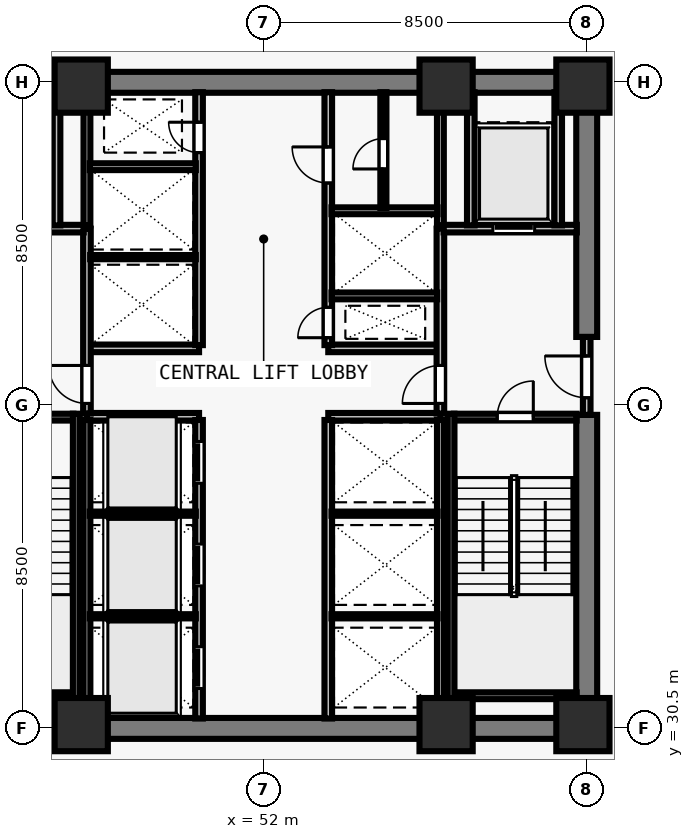
"""IFC4 building model, lengths in metres.
Left out: names, types, materials, properties, quantities, classifications, styles, units other than length and angle.
Written with IfcOpenShell. Run it as: python <this file> out.ifc"""

import sys

from ifc_helpers import new_model, si_unit, direction, frame, frame_2d, origin, origin_2d, place, context, subcontext, project, spatial, rectangle, extrude, element, fill, save


model = new_model("IFC4")
c1 = context("Model", 3, precision=1e-05, world=origin(), true_north=direction((0.0, 1.0)))
c2 = subcontext(c1, "Body", "Model", "MODEL_VIEW")
j1 = project(units=[si_unit("LENGTHUNIT", "METRE"), si_unit("PLANEANGLEUNIT", "RADIAN")], contexts=[c1])
p1 = place(None, origin())
s1 = spatial("IfcSite", under=j1, at=p1, CompositionType="ELEMENT")
p2 = place(p1, origin())
s2 = spatial("IfcBuilding", under=s1, at=p2, CompositionType="ELEMENT")
p3 = place(p2, frame((0.0, 0.0, 14.5)))
s3 = spatial("IfcBuildingStorey", under=s2, at=p3, CompositionType="ELEMENT", Elevation=14.5)
for number, where, z_axis, x_axis in (
    (1, (47.2, 30.6, 0.0), (0.0, 0.0, 1.0), (1.0, 0.0, 0.0)),
    (2, (56.8, 30.6, 0.0), (0.0, 0.0, 1.0), (1.0, 0.0, 0.0)),
    (3, (60.4, 30.6, 0.0), (0.0, 0.0, 1.0), (1.0, 0.0, 0.0)),
    (4, (47.2, 47.4, 0.0), (0.0, 0.0, 1.0), (1.0, 0.0, 0.0)),
    (5, (56.8, 47.4, 0.0), (0.0, 0.0, 1.0), (1.0, 0.0, 0.0)),
    (6, (60.4, 47.4, 0.0), (0.0, 0.0, 1.0), (1.0, 0.0, 0.0)),
):
    element("IfcColumn", number, at=place(p3, frame(where, z_axis=z_axis, x_axis=x_axis)), inside=s3, PredefinedType="COLUMN", context=c2, shape_type="SweptSolid", body=[
        extrude(rectangle(XDim=1.4, YDim=1.4, at=origin_2d()), origin(), (0.0, 0.0, 1.0), 4.5),
    ])
for number, where, z_axis, x_axis in (
    (7, (43.225, 30.5, 0.0), (0.0, 0.0, 1.0), (1.0, 0.0, 0.0)),
    (8, (43.225, 47.5, 0.0), (0.0, 0.0, 1.0), (1.0, 0.0, 0.0)),
):
    element("IfcWall", number, at=place(p3, frame(where, z_axis=z_axis, x_axis=x_axis)), inside=s3, PredefinedType="SHEAR", context=c2, shape_type="SweptSolid", body=[
        extrude(rectangle(XDim=17.55, YDim=0.55, at=frame_2d((8.775, 0.0))), origin(), (0.0, 0.0, 1.0), 4.15),
    ])
p4 = place(p3, frame((60.5, 30.765, 0.0), z_axis=(0.0, 0.0, 1.0), x_axis=(0.0, 1.0, 0.0)))
e9 = element("IfcWall", 9, at=p4, inside=s3, PredefinedType="SHEAR", context=c2, shape_type="SweptSolid", body=[
    extrude(rectangle(XDim=7.985, YDim=0.55, at=frame_2d((3.993, 0.0))), origin(), (0.0, 0.0, 1.0), 4.15),
])
p5 = place(p3, frame((60.5, 40.8, 0.0), z_axis=(0.0, 0.0, 1.0), x_axis=(0.0, 1.0, 0.0)))
e10 = element("IfcWall", 10, at=p5, inside=s3, PredefinedType="SHEAR", context=c2, shape_type="SweptSolid", body=[
    extrude(rectangle(XDim=6.435, YDim=0.55, at=frame_2d((3.218, 0.0))), origin(), (0.0, 0.0, 1.0), 4.15),
])
for number, where, z_axis, x_axis in (
    (11, (47.35, 38.7, 0.0), (0.0, 0.0, 1.0), (1.0, 0.0, 0.0)),
    (12, (47.35, 40.5, 0.0), (0.0, 0.0, 1.0), (1.0, 0.0, 0.0)),
    (13, (53.7, 38.7, 0.0), (0.0, 0.0, 1.0), (1.0, 0.0, 0.0)),
    (14, (53.7, 40.5, 0.0), (0.0, 0.0, 1.0), (1.0, 0.0, 0.0)),
):
    element("IfcWall", number, at=place(p3, frame(where, z_axis=z_axis, x_axis=x_axis)), inside=s3, PredefinedType="SOLIDWALL", context=c2, shape_type="SweptSolid", body=[
        extrude(rectangle(XDim=2.95, YDim=0.2, at=frame_2d((1.475, 0.0))), origin(), (0.0, 0.0, 1.0), 4.15),
    ])
p6 = place(p3, frame((50.3, 30.76, 0.0), z_axis=(0.0, 0.0, 1.0), x_axis=(0.0, 1.0, 0.0)))
e15 = element("IfcWall", 15, at=p6, inside=s3, PredefinedType="SOLIDWALL", context=c2, shape_type="SweptSolid", body=[
    extrude(rectangle(XDim=7.855, YDim=0.2, at=frame_2d((3.927, 0.0))), origin(), (0.0, 0.0, 1.0), 4.15),
])
p7 = place(p6, frame((0.79, 0.0, 0.0)))
e16 = element("IfcOpeningElement", 16, at=p7, cuts=e15, PredefinedType="OPENING", context=c2, shape_type="SweptSolid", body=[
    extrude(rectangle(XDim=1.1, YDim=2.2, at=frame_2d((0.55, 1.1))), frame((0.0, 0.11, 0.0), z_axis=(0.0, -1.0, 0.0), x_axis=(1.0, 0.0, 0.0)), (0.0, 0.0, 1.0), 0.22),
])
p8 = place(p6, frame((3.49, 0.0, 0.0)))
e17 = element("IfcOpeningElement", 17, at=p8, cuts=e15, PredefinedType="OPENING", context=c2, shape_type="SweptSolid", body=[
    extrude(rectangle(XDim=1.1, YDim=2.2, at=frame_2d((0.55, 1.1))), frame((0.0, 0.11, 0.0), z_axis=(0.0, -1.0, 0.0), x_axis=(1.0, 0.0, 0.0)), (0.0, 0.0, 1.0), 0.22),
])
p9 = place(p6, frame((6.19, 0.0, 0.0)))
e18 = element("IfcOpeningElement", 18, at=p9, cuts=e15, PredefinedType="OPENING", context=c2, shape_type="SweptSolid", body=[
    extrude(rectangle(XDim=1.1, YDim=2.2, at=frame_2d((0.55, 1.1))), frame((0.0, 0.11, 0.0), z_axis=(0.0, -1.0, 0.0), x_axis=(1.0, 0.0, 0.0)), (0.0, 0.0, 1.0), 0.22),
])
p10 = place(p3, frame((53.7, 30.76, 0.0), z_axis=(0.0, 0.0, 1.0), x_axis=(0.0, 1.0, 0.0)))
e19 = element("IfcWall", 19, at=p10, inside=s3, PredefinedType="SOLIDWALL", context=c2, shape_type="SweptSolid", body=[
    extrude(rectangle(XDim=7.855, YDim=0.2, at=frame_2d((3.927, 0.0))), origin(), (0.0, 0.0, 1.0), 4.15),
])
p11 = place(p3, frame((50.3, 40.585, 0.0), z_axis=(0.0, 0.0, 1.0), x_axis=(0.0, 1.0, 0.0)))
e20 = element("IfcWall", 20, at=p11, inside=s3, PredefinedType="SOLIDWALL", context=c2, shape_type="SweptSolid", body=[
    extrude(rectangle(XDim=6.655, YDim=0.2, at=frame_2d((3.328, 0.0))), origin(), (0.0, 0.0, 1.0), 4.15),
])
p12 = place(p11, frame((5.065, 0.0, 0.0)))
e21 = element("IfcOpeningElement", 21, at=p12, cuts=e20, PredefinedType="OPENING", context=c2, shape_type="SweptSolid", body=[
    extrude(rectangle(XDim=0.8, YDim=2.08, at=frame_2d((0.4, 1.04))), frame((0.0, 0.11, 0.0), z_axis=(0.0, -1.0, 0.0), x_axis=(1.0, 0.0, 0.0)), (0.0, 0.0, 1.0), 0.22),
])
p13 = place(p3, frame((53.7, 40.585, 0.0), z_axis=(0.0, 0.0, 1.0), x_axis=(0.0, 1.0, 0.0)))
e22 = element("IfcWall", 22, at=p13, inside=s3, PredefinedType="SOLIDWALL", context=c2, shape_type="SweptSolid", body=[
    extrude(rectangle(XDim=6.655, YDim=0.2, at=frame_2d((3.328, 0.0))), origin(), (0.0, 0.0, 1.0), 4.15),
])
p14 = place(p13, frame((0.195, 0.0, 0.0)))
e23 = element("IfcOpeningElement", 23, at=p14, cuts=e22, PredefinedType="OPENING", context=c2, shape_type="SweptSolid", body=[
    extrude(rectangle(XDim=0.8, YDim=2.08, at=frame_2d((0.4, 1.04))), frame((0.0, 0.11, 0.0), z_axis=(0.0, -1.0, 0.0), x_axis=(1.0, 0.0, 0.0)), (0.0, 0.0, 1.0), 0.22),
])
p15 = place(p13, frame((4.265, 0.0, 0.0)))
e24 = element("IfcOpeningElement", 24, at=p15, cuts=e22, PredefinedType="OPENING", context=c2, shape_type="SweptSolid", body=[
    extrude(rectangle(XDim=0.95, YDim=2.12, at=frame_2d((0.475, 1.06))), frame((0.0, 0.11, 0.0), z_axis=(0.0, -1.0, 0.0), x_axis=(1.0, 0.0, 0.0)), (0.0, 0.0, 1.0), 0.22),
])
p16 = place(p3, frame((47.35, 38.785, 0.0), z_axis=(0.0, 0.0, 1.0), x_axis=(0.0, 1.0, 0.0)))
e25 = element("IfcWall", 25, at=p16, inside=s3, PredefinedType="SOLIDWALL", context=c2, shape_type="SweptSolid", body=[
    extrude(rectangle(XDim=4.865, YDim=0.2, at=frame_2d((2.433, 0.0))), origin(), (0.0, 0.0, 1.0), 4.15),
])
p17 = place(p16, frame((0.265, 0.0, 0.0)))
e26 = element("IfcOpeningElement", 26, at=p17, cuts=e25, PredefinedType="OPENING", context=c2, shape_type="SweptSolid", body=[
    extrude(rectangle(XDim=1.0, YDim=2.15, at=frame_2d((0.5, 1.075))), frame((0.0, 0.11, 0.0), z_axis=(0.0, -1.0, 0.0), x_axis=(1.0, 0.0, 0.0)), (0.0, 0.0, 1.0), 0.22),
])
p18 = place(p3, frame((43.76, 43.65, 0.0), z_axis=(0.0, 0.0, 1.0), x_axis=(1.0, 0.0, 0.0)))
e27 = element("IfcWall", 27, at=p18, inside=s3, PredefinedType="SOLIDWALL", context=c2, shape_type="SweptSolid", body=[
    extrude(rectangle(XDim=3.505, YDim=0.2, at=frame_2d((1.752, 0.0))), origin(), (0.0, 0.0, 1.0), 4.15),
])
p19 = place(p18, frame((1.11, 0.0, 0.0)))
e28 = element("IfcOpeningElement", 28, at=p19, cuts=e27, PredefinedType="OPENING", context=c2, shape_type="SweptSolid", body=[
    extrude(rectangle(XDim=1.1, YDim=2.2, at=frame_2d((0.55, 1.1))), frame((0.0, 0.11, 0.0), z_axis=(0.0, -1.0, 0.0), x_axis=(1.0, 0.0, 0.0)), (0.0, 0.0, 1.0), 0.22),
])
p20 = place(p3, frame((46.55, 43.735, 0.0), z_axis=(0.0, 0.0, 1.0), x_axis=(0.0, 1.0, 0.0)))
e29 = element("IfcWall", 29, at=p20, inside=s3, PredefinedType="SOLIDWALL", context=c2, shape_type="SweptSolid", body=[
    extrude(rectangle(XDim=3.505, YDim=0.2, at=frame_2d((1.752, 0.0))), origin(), (0.0, 0.0, 1.0), 4.15),
])
p21 = place(p3, frame((60.5, 38.75, 0.0), z_axis=(0.0, 0.0, 1.0), x_axis=(0.0, 1.0, 0.0)))
e30 = element("IfcWall", 30, at=p21, inside=s3, PredefinedType="SOLIDWALL", context=c2, shape_type="SweptSolid", body=[
    extrude(rectangle(XDim=2.05, YDim=0.2, at=frame_2d((1.025, 0.0))), origin(), (0.0, 0.0, 1.0), 4.15),
])
p22 = place(p21, frame((0.45, 0.0, 0.0)))
e31 = element("IfcOpeningElement", 31, at=p22, cuts=e30, PredefinedType="OPENING", context=c2, shape_type="SweptSolid", body=[
    extrude(rectangle(XDim=1.1, YDim=2.15, at=frame_2d((0.55, 1.075))), frame((0.0, 0.11, 0.0), z_axis=(0.0, -1.0, 0.0), x_axis=(1.0, 0.0, 0.0)), (0.0, 0.0, 1.0), 0.22),
])
p23 = place(p3, frame((56.65, 38.785, 0.0), z_axis=(0.0, 0.0, 1.0), x_axis=(0.0, 1.0, 0.0)))
e32 = element("IfcWall", 32, at=p23, inside=s3, PredefinedType="SOLIDWALL", context=c2, shape_type="SweptSolid", body=[
    extrude(rectangle(XDim=4.865, YDim=0.2, at=frame_2d((2.433, 0.0))), origin(), (0.0, 0.0, 1.0), 4.15),
])
p24 = place(p23, frame((0.265, 0.0, 0.0)))
e33 = element("IfcOpeningElement", 33, at=p24, cuts=e32, PredefinedType="OPENING", context=c2, shape_type="SweptSolid", body=[
    extrude(rectangle(XDim=1.0, YDim=2.15, at=frame_2d((0.5, 1.075))), frame((0.0, 0.11, 0.0), z_axis=(0.0, -1.0, 0.0), x_axis=(1.0, 0.0, 0.0)), (0.0, 0.0, 1.0), 0.22),
])
p25 = place(p3, frame((56.735, 43.65, 0.0), z_axis=(0.0, 0.0, 1.0), x_axis=(1.0, 0.0, 0.0)))
e34 = element("IfcWall", 34, at=p25, inside=s3, PredefinedType="SOLIDWALL", context=c2, shape_type="SweptSolid", body=[
    extrude(rectangle(XDim=3.505, YDim=0.2, at=frame_2d((1.752, 0.0))), origin(), (0.0, 0.0, 1.0), 4.15),
])
p26 = place(p25, frame((1.295, 0.0, 0.0)))
e35 = element("IfcOpeningElement", 35, at=p26, cuts=e34, PredefinedType="OPENING", context=c2, shape_type="SweptSolid", body=[
    extrude(rectangle(XDim=1.1, YDim=2.2, at=frame_2d((0.55, 1.1))), frame((0.0, 0.11, 0.0), z_axis=(0.0, -1.0, 0.0), x_axis=(1.0, 0.0, 0.0)), (0.0, 0.0, 1.0), 0.22),
])
for number, where, z_axis, x_axis in (
    (36, (57.45, 43.735, 0.0), (0.0, 0.0, 1.0), (0.0, 1.0, 0.0)),
    (37, (59.75, 43.735, 0.0), (0.0, 0.0, 1.0), (0.0, 1.0, 0.0)),
):
    element("IfcWall", number, at=place(p3, frame(where, z_axis=z_axis, x_axis=x_axis)), inside=s3, PredefinedType="SOLIDWALL", context=c2, shape_type="SweptSolid", body=[
        extrude(rectangle(XDim=3.505, YDim=0.2, at=frame_2d((1.752, 0.0))), origin(), (0.0, 0.0, 1.0), 4.15),
    ])
p27 = place(p3, frame((47.35, 30.76, 0.0), z_axis=(0.0, 0.0, 1.0), x_axis=(0.0, 1.0, 0.0)))
e38 = element("IfcWall", 38, at=p27, inside=s3, PredefinedType="SOLIDWALL", context=c2, shape_type="SweptSolid", body=[
    extrude(rectangle(XDim=7.855, YDim=0.18, at=frame_2d((3.927, 0.0))), origin(), (0.0, 0.0, 1.0), 4.15),
])
for number, where, z_axis, x_axis in (
    (39, (47.425, 33.45, 0.0), (0.0, 0.0, 1.0), (1.0, 0.0, 0.0)),
    (40, (47.425, 36.15, 0.0), (0.0, 0.0, 1.0), (1.0, 0.0, 0.0)),
):
    element("IfcWall", number, at=place(p3, frame(where, z_axis=z_axis, x_axis=x_axis)), inside=s3, PredefinedType="PARTITIONING", context=c2, shape_type="SweptSolid", body=[
        extrude(rectangle(XDim=2.79, YDim=0.11, at=frame_2d((1.395, 0.0))), origin(), (0.0, 0.0, 1.0), 4.15),
    ])
p28 = place(p3, frame((56.65, 30.76, 0.0), z_axis=(0.0, 0.0, 1.0), x_axis=(0.0, 1.0, 0.0)))
e41 = element("IfcWall", 41, at=p28, inside=s3, PredefinedType="SOLIDWALL", context=c2, shape_type="SweptSolid", body=[
    extrude(rectangle(XDim=7.855, YDim=0.18, at=frame_2d((3.927, 0.0))), origin(), (0.0, 0.0, 1.0), 4.15),
])
for number, where, z_axis, x_axis in (
    (42, (53.785, 33.45, 0.0), (0.0, 0.0, 1.0), (1.0, 0.0, 0.0)),
    (43, (53.785, 36.15, 0.0), (0.0, 0.0, 1.0), (1.0, 0.0, 0.0)),
):
    element("IfcWall", number, at=place(p3, frame(where, z_axis=z_axis, x_axis=x_axis)), inside=s3, PredefinedType="PARTITIONING", context=c2, shape_type="SweptSolid", body=[
        extrude(rectangle(XDim=2.79, YDim=0.11, at=frame_2d((1.395, 0.0))), origin(), (0.0, 0.0, 1.0), 4.15),
    ])
p29 = place(p3, frame((47.35, 43.735, 0.0), z_axis=(0.0, 0.0, 1.0), x_axis=(0.0, 1.0, 0.0)))
e44 = element("IfcWall", 44, at=p29, inside=s3, PredefinedType="SOLIDWALL", context=c2, shape_type="SweptSolid", body=[
    extrude(rectangle(XDim=3.505, YDim=0.18, at=frame_2d((1.752, 0.0))), origin(), (0.0, 0.0, 1.0), 4.15),
])
p30 = place(p3, frame((47.435, 42.9, 0.0), z_axis=(0.0, 0.0, 1.0), x_axis=(1.0, 0.0, 0.0)))
e45 = element("IfcWall", 45, at=p30, inside=s3, PredefinedType="PARTITIONING", context=c2, shape_type="SweptSolid", body=[
    extrude(rectangle(XDim=2.78, YDim=0.11, at=frame_2d((1.39, 0.0))), origin(), (0.0, 0.0, 1.0), 4.15),
])
p31 = place(p3, frame((47.425, 45.28, 0.0), z_axis=(0.0, 0.0, 1.0), x_axis=(1.0, 0.0, 0.0)))
e46 = element("IfcWall", 46, at=p31, inside=s3, PredefinedType="SOLIDWALL", context=c2, shape_type="SweptSolid", body=[
    extrude(rectangle(XDim=2.79, YDim=0.18, at=frame_2d((1.395, 0.0))), origin(), (0.0, 0.0, 1.0), 4.15),
])
p32 = place(p3, frame((56.65, 43.735, 0.0), z_axis=(0.0, 0.0, 1.0), x_axis=(0.0, 1.0, 0.0)))
e47 = element("IfcWall", 47, at=p32, inside=s3, PredefinedType="SOLIDWALL", context=c2, shape_type="SweptSolid", body=[
    extrude(rectangle(XDim=3.505, YDim=0.18, at=frame_2d((1.752, 0.0))), origin(), (0.0, 0.0, 1.0), 4.15),
])
p33 = place(p3, frame((53.785, 41.88, 0.0), z_axis=(0.0, 0.0, 1.0), x_axis=(1.0, 0.0, 0.0)))
e48 = element("IfcWall", 48, at=p33, inside=s3, PredefinedType="SOLIDWALL", context=c2, shape_type="SweptSolid", body=[
    extrude(rectangle(XDim=2.78, YDim=0.18, at=frame_2d((1.39, 0.0))), origin(), (0.0, 0.0, 1.0), 4.15),
])
p34 = place(p3, frame((53.785, 44.12, 0.0), z_axis=(0.0, 0.0, 1.0), x_axis=(1.0, 0.0, 0.0)))
e49 = element("IfcWall", 49, at=p34, inside=s3, PredefinedType="SOLIDWALL", context=c2, shape_type="SweptSolid", body=[
    extrude(rectangle(XDim=2.79, YDim=0.18, at=frame_2d((1.395, 0.0))), origin(), (0.0, 0.0, 1.0), 4.15),
])
p35 = place(p3, frame((55.15, 44.195, 0.0), z_axis=(0.0, 0.0, 1.0), x_axis=(0.0, 1.0, 0.0)))
e50 = element("IfcWall", 50, at=p35, inside=s3, PredefinedType="PARTITIONING", context=c2, shape_type="SweptSolid", body=[
    extrude(rectangle(XDim=3.045, YDim=0.16, at=frame_2d((1.522, 0.0))), origin(), (0.0, 0.0, 1.0), 4.15),
])
p36 = place(p35, frame((1.025, 0.0, 0.0)))
e51 = element("IfcOpeningElement", 51, at=p36, cuts=e50, PredefinedType="OPENING", context=c2, shape_type="SweptSolid", body=[
    extrude(rectangle(XDim=0.8, YDim=2.1, at=frame_2d((0.4, 1.05))), frame((0.0, 0.09, 0.0), z_axis=(0.0, -1.0, 0.0), x_axis=(1.0, 0.0, 0.0)), (0.0, 0.0, 1.0), 0.18),
])
p37 = place(p3, frame((43.765, 38.69, 0.0), z_axis=(0.0, 0.0, 1.0), x_axis=(1.0, 0.0, 0.0)))
e52 = element("IfcWall", 52, at=p37, inside=s3, PredefinedType="SOLIDWALL", context=c2, shape_type="SweptSolid", body=[
    extrude(rectangle(XDim=3.23, YDim=0.18, at=frame_2d((1.615, 0.0))), origin(), (0.0, 0.0, 1.0), 4.15),
])
p38 = place(p37, frame((1.14, 0.0, 0.0)))
e53 = element("IfcOpeningElement", 53, at=p38, cuts=e52, PredefinedType="OPENING", context=c2, shape_type="SweptSolid", body=[
    extrude(rectangle(XDim=0.95, YDim=2.15, at=frame_2d((0.475, 1.075))), frame((0.0, 0.1, 0.0), z_axis=(0.0, -1.0, 0.0), x_axis=(1.0, 0.0, 0.0)), (0.0, 0.0, 1.0), 0.2),
])
p39 = place(p3, frame((43.765, 31.36, 0.0), z_axis=(0.0, 0.0, 1.0), x_axis=(1.0, 0.0, 0.0)))
e54 = element("IfcWall", 54, at=p39, inside=s3, PredefinedType="SOLIDWALL", context=c2, shape_type="SweptSolid", body=[
    extrude(rectangle(XDim=3.23, YDim=0.18, at=frame_2d((1.615, 0.0))), origin(), (0.0, 0.0, 1.0), 4.15),
])
p40 = place(p3, frame((47.07, 38.78, 0.0), z_axis=(0.0, 0.0, 1.0), x_axis=(0.0, -1.0, 0.0)))
e55 = element("IfcWall", 55, at=p40, inside=s3, PredefinedType="SOLIDWALL", context=c2, shape_type="SweptSolid", body=[
    extrude(rectangle(XDim=8.017, YDim=0.18, at=frame_2d((4.009, 0.0))), origin(), (0.0, 0.0, 1.0), 4.15),
])
p41 = place(p3, frame((57.005, 38.69, 0.0), z_axis=(0.0, 0.0, 1.0), x_axis=(1.0, 0.0, 0.0)))
e56 = element("IfcWall", 56, at=p41, inside=s3, PredefinedType="SOLIDWALL", context=c2, shape_type="SweptSolid", body=[
    extrude(rectangle(XDim=3.23, YDim=0.18, at=frame_2d((1.615, 0.0))), origin(), (0.0, 0.0, 1.0), 4.15),
])
p42 = place(p41, frame((1.14, 0.0, 0.0)))
e57 = element("IfcOpeningElement", 57, at=p42, cuts=e56, PredefinedType="OPENING", context=c2, shape_type="SweptSolid", body=[
    extrude(rectangle(XDim=0.95, YDim=2.15, at=frame_2d((0.475, 1.075))), frame((0.0, 0.1, 0.0), z_axis=(0.0, -1.0, 0.0), x_axis=(1.0, 0.0, 0.0)), (0.0, 0.0, 1.0), 0.2),
])
p43 = place(p3, frame((57.005, 31.36, 0.0), z_axis=(0.0, 0.0, 1.0), x_axis=(1.0, 0.0, 0.0)))
e58 = element("IfcWall", 58, at=p43, inside=s3, PredefinedType="SOLIDWALL", context=c2, shape_type="SweptSolid", body=[
    extrude(rectangle(XDim=3.23, YDim=0.18, at=frame_2d((1.615, 0.0))), origin(), (0.0, 0.0, 1.0), 4.15),
])
p44 = place(p3, frame((56.93, 38.78, 0.0), z_axis=(0.0, 0.0, 1.0), x_axis=(0.0, -1.0, 0.0)))
e59 = element("IfcWall", 59, at=p44, inside=s3, PredefinedType="SOLIDWALL", context=c2, shape_type="SweptSolid", body=[
    extrude(rectangle(XDim=8.017, YDim=0.18, at=frame_2d((4.009, 0.0))), origin(), (0.0, 0.0, 1.0), 4.15),
])
p45 = place(p17, origin())
e60 = element("IfcDoor", 60, at=p45, inside=s3, OperationType="SINGLE_SWING_RIGHT", PredefinedType="DOOR", context=c2, shape_type="SweptSolid", body=[
    extrude(rectangle(XDim=1.0, YDim=2.15, at=frame_2d((0.5, 1.075))), frame((0.0, 0.025, 0.0), z_axis=(0.0, -1.0, 0.0), x_axis=(1.0, 0.0, 0.0)), (0.0, 0.0, 1.0), 0.05),
])
fill(e26, e60)
p46 = place(p22, origin())
e61 = element("IfcDoor", 61, at=p46, inside=s3, OperationType="SINGLE_SWING_RIGHT", PredefinedType="DOOR", context=c2, shape_type="SweptSolid", body=[
    extrude(rectangle(XDim=1.1, YDim=2.15, at=frame_2d((0.55, 1.075))), frame((0.0, 0.025, 0.0), z_axis=(0.0, -1.0, 0.0), x_axis=(1.0, 0.0, 0.0)), (0.0, 0.0, 1.0), 0.05),
])
fill(e31, e61)
p47 = place(p24, origin())
e62 = element("IfcDoor", 62, at=p47, inside=s3, OperationType="SINGLE_SWING_LEFT", PredefinedType="DOOR", context=c2, shape_type="SweptSolid", body=[
    extrude(rectangle(XDim=1.0, YDim=2.15, at=frame_2d((0.5, 1.075))), frame((0.0, 0.025, 0.0), z_axis=(0.0, -1.0, 0.0), x_axis=(1.0, 0.0, 0.0)), (0.0, 0.0, 1.0), 0.05),
])
fill(e33, e62)
p48 = place(p26, origin())
e63 = element("IfcDoor", 63, at=p48, inside=s3, OperationType="SLIDING_TO_LEFT", PredefinedType="DOOR", context=c2, shape_type="SweptSolid", body=[
    extrude(rectangle(XDim=1.1, YDim=2.2, at=frame_2d((0.55, 1.1))), frame((0.0, 0.025, 0.0), z_axis=(0.0, -1.0, 0.0), x_axis=(1.0, 0.0, 0.0)), (0.0, 0.0, 1.0), 0.05),
])
fill(e35, e63)
p49 = place(p7, origin())
e64 = element("IfcDoor", 64, at=p49, inside=s3, OperationType="SLIDING_TO_LEFT", PredefinedType="DOOR", context=c2, shape_type="SweptSolid", body=[
    extrude(rectangle(XDim=1.1, YDim=2.2, at=frame_2d((0.55, 1.1))), frame((0.0, 0.025, 0.0), z_axis=(0.0, -1.0, 0.0), x_axis=(1.0, 0.0, 0.0)), (0.0, 0.0, 1.0), 0.05),
])
fill(e16, e64)
p50 = place(p8, origin())
e65 = element("IfcDoor", 65, at=p50, inside=s3, OperationType="SLIDING_TO_LEFT", PredefinedType="DOOR", context=c2, shape_type="SweptSolid", body=[
    extrude(rectangle(XDim=1.1, YDim=2.2, at=frame_2d((0.55, 1.1))), frame((0.0, 0.025, 0.0), z_axis=(0.0, -1.0, 0.0), x_axis=(1.0, 0.0, 0.0)), (0.0, 0.0, 1.0), 0.05),
])
fill(e17, e65)
p51 = place(p9, origin())
e66 = element("IfcDoor", 66, at=p51, inside=s3, OperationType="SLIDING_TO_LEFT", PredefinedType="DOOR", context=c2, shape_type="SweptSolid", body=[
    extrude(rectangle(XDim=1.1, YDim=2.2, at=frame_2d((0.55, 1.1))), frame((0.0, 0.025, 0.0), z_axis=(0.0, -1.0, 0.0), x_axis=(1.0, 0.0, 0.0)), (0.0, 0.0, 1.0), 0.05),
])
fill(e18, e66)
p52 = place(p12, origin())
e67 = element("IfcDoor", 67, at=p52, inside=s3, OperationType="SINGLE_SWING_RIGHT", PredefinedType="DOOR", context=c2, shape_type="SweptSolid", body=[
    extrude(rectangle(XDim=0.8, YDim=2.08, at=frame_2d((0.4, 1.04))), frame((0.0, 0.025, 0.0), z_axis=(0.0, -1.0, 0.0), x_axis=(1.0, 0.0, 0.0)), (0.0, 0.0, 1.0), 0.05),
])
fill(e21, e67)
p53 = place(p14, origin())
e68 = element("IfcDoor", 68, at=p53, inside=s3, OperationType="SINGLE_SWING_LEFT", PredefinedType="DOOR", context=c2, shape_type="SweptSolid", body=[
    extrude(rectangle(XDim=0.8, YDim=2.08, at=frame_2d((0.4, 1.04))), frame((0.0, 0.025, 0.0), z_axis=(0.0, -1.0, 0.0), x_axis=(1.0, 0.0, 0.0)), (0.0, 0.0, 1.0), 0.05),
])
fill(e23, e68)
p54 = place(p15, origin())
e69 = element("IfcDoor", 69, at=p54, inside=s3, OperationType="SINGLE_SWING_RIGHT", PredefinedType="DOOR", context=c2, shape_type="SweptSolid", body=[
    extrude(rectangle(XDim=0.95, YDim=2.12, at=frame_2d((0.475, 1.06))), frame((0.0, 0.025, 0.0), z_axis=(0.0, -1.0, 0.0), x_axis=(1.0, 0.0, 0.0)), (0.0, 0.0, 1.0), 0.05),
])
fill(e24, e69)
p55 = place(p36, origin())
e70 = element("IfcDoor", 70, at=p55, inside=s3, OperationType="SINGLE_SWING_LEFT", PredefinedType="DOOR", context=c2, shape_type="SweptSolid", body=[
    extrude(rectangle(XDim=0.8, YDim=2.1, at=frame_2d((0.4, 1.05))), frame((0.0, 0.025, 0.0), z_axis=(0.0, -1.0, 0.0), x_axis=(1.0, 0.0, 0.0)), (0.0, 0.0, 1.0), 0.05),
])
fill(e51, e70)
p56 = place(p42, origin())
e71 = element("IfcDoor", 71, at=p56, inside=s3, OperationType="SINGLE_SWING_RIGHT", PredefinedType="DOOR", context=c2, shape_type="SweptSolid", body=[
    extrude(rectangle(XDim=0.95, YDim=2.15, at=frame_2d((0.475, 1.075))), frame((0.0, 0.025, 0.0), z_axis=(0.0, -1.0, 0.0), x_axis=(1.0, 0.0, 0.0)), (0.0, 0.0, 1.0), 0.05),
])
fill(e57, e71)
save(model, sys.argv[1])
